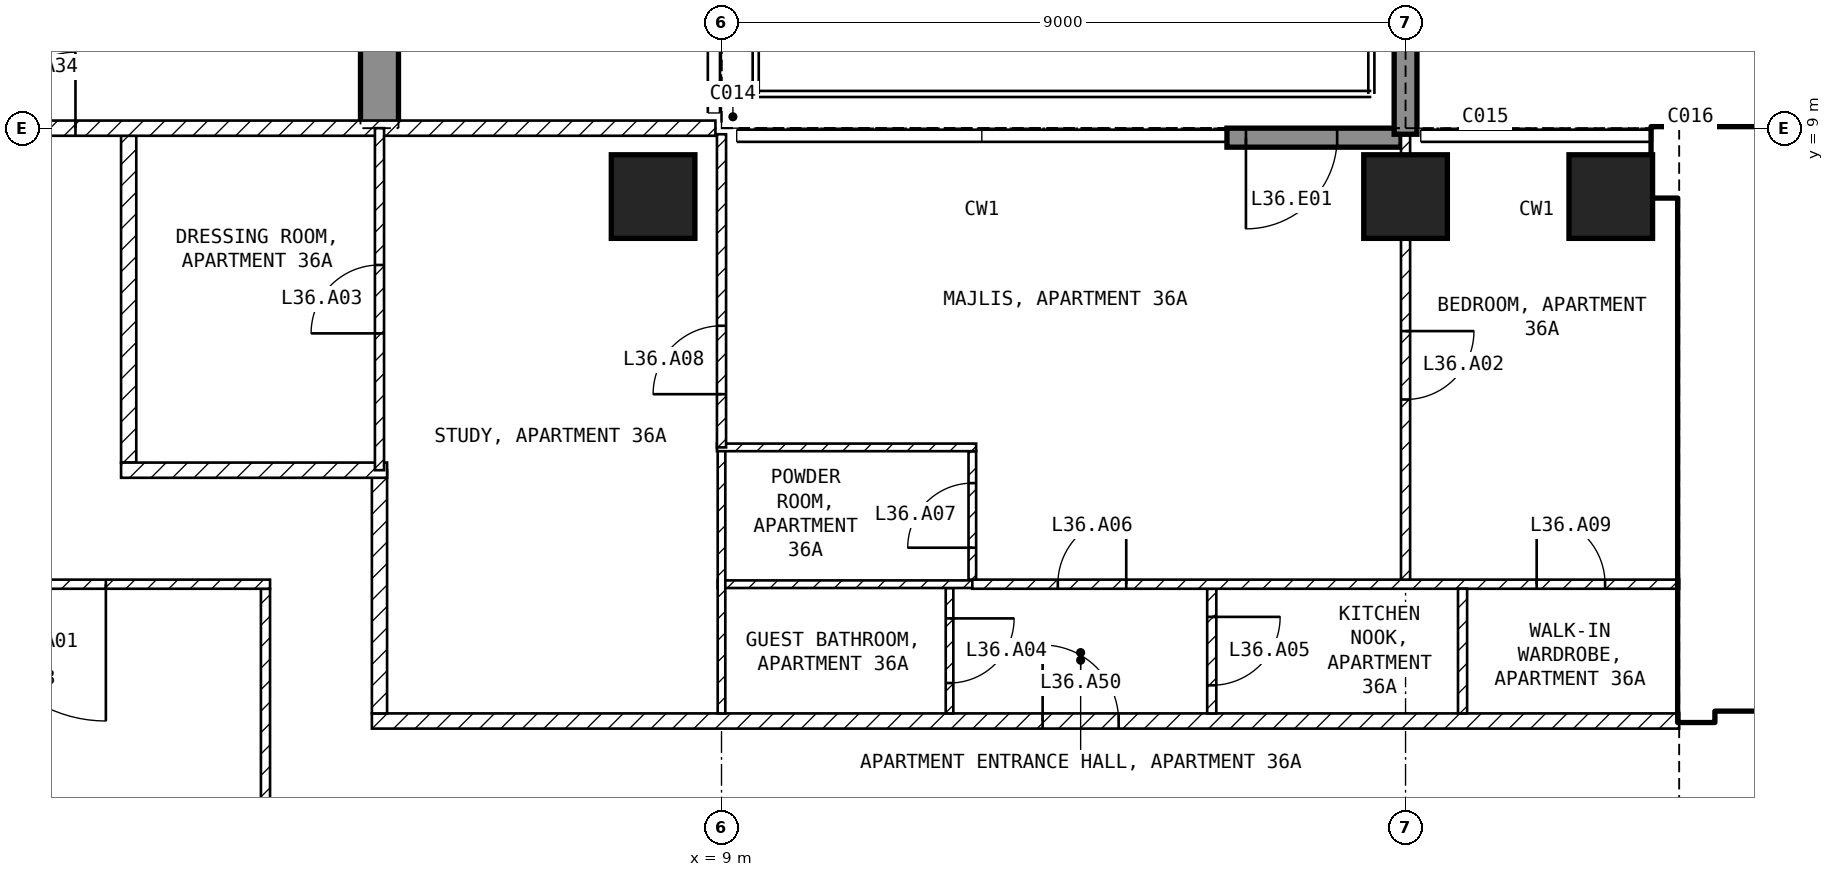
"""IFC4 building model, lengths in metres.
Left out: names, types, materials, properties, quantities, classifications, styles, units other than length and angle.
Written with IfcOpenShell. Run it as: python <this file> out.ifc"""

import sys

from ifc_helpers import new_model, si_unit, direction, frame, frame_2d, origin, origin_2d, place, context, subcontext, project, spatial, polyline, rectangle, outline, extrude, element, fill, save


model = new_model("IFC4")
c1 = context("Model", 3, precision=1e-05, world=origin(), true_north=direction((0.0, 1.0)))
c2 = subcontext(c1, "Body", "Model", "MODEL_VIEW")
j1 = project(units=[si_unit("LENGTHUNIT", "METRE"), si_unit("PLANEANGLEUNIT", "RADIAN")], contexts=[c1])
p1 = place(None, origin())
s1 = spatial("IfcSite", under=j1, at=p1, CompositionType="ELEMENT")
p2 = place(p1, origin())
s2 = spatial("IfcBuilding", under=s1, at=p2, CompositionType="ELEMENT")
p3 = place(p2, frame((0.0, 0.0, 147.9)))
s3 = spatial("IfcBuildingStorey", under=s2, at=p3, CompositionType="ELEMENT", Elevation=147.9)
for number, where, z_axis, x_axis in (
    (1, (8.1, 8.1, -0.25), (0.0, 0.0, 1.0), (1.0, 0.0, 0.0)),
    (2, (18.0, 8.1, -0.25), (0.0, 0.0, 1.0), (1.0, 0.0, 0.0)),
    (3, (20.7, 8.1, -0.25), (0.0, 0.0, 1.0), (1.0, 0.0, 0.0)),
):
    element("IfcColumn", number, at=place(p3, frame(where, z_axis=z_axis, x_axis=x_axis)), inside=s3, PredefinedType="COLUMN", context=c2, shape_type="SweptSolid", body=[
        extrude(rectangle(XDim=1.1, YDim=1.1, at=origin_2d()), origin(), (0.0, 0.0, 1.0), 3.5),
    ])
p4 = place(p3, frame((4.25, 9.0, -0.25), z_axis=(1.0, 0.0, 0.0), x_axis=(0.0, 1.0, 0.0)))
e4 = element("IfcWall", 4, at=p4, inside=s3, PredefinedType="SHEAR", context=c2, shape_type="SweptSolid", body=[
    extrude(outline(polyline([(0.0, 0.0), (2.1, 0.0), (2.1, 2.65), (4.5, 2.65), (4.5, 0.0), (9.9, 0.0), (9.9, 2.65), (12.3, 2.65), (12.3, 0.0), (16.55, 0.0), (16.55, 3.5), (0.0, 3.5), (0.0, 0.0)])), origin(), (0.0, 0.0, 1.0), 0.5),
])
p5 = place(p3, frame((17.94, 8.875, 0.0), z_axis=(0.0, 0.0, 1.0), x_axis=(-1.0, 0.0, 0.0)))
e5 = element("IfcWall", 5, at=p5, inside=s3, PredefinedType="SOLIDWALL", context=c2, shape_type="SweptSolid", body=[
    extrude(rectangle(XDim=2.29, YDim=0.25, at=frame_2d((1.145, 0.0))), origin(), (0.0, 0.0, 1.0), 3.25),
])
p6 = place(p5, frame((0.84, 0.0, 0.0)))
e6 = element("IfcOpeningElement", 6, at=p6, cuts=e5, PredefinedType="OPENING", context=c2, shape_type="SweptSolid", body=[
    extrude(rectangle(XDim=1.2, YDim=2.4, at=frame_2d((0.6, 1.2))), frame((0.0, 0.135, 0.0), z_axis=(0.0, -1.0, 0.0), x_axis=(1.0, 0.0, 0.0)), (0.0, 0.0, 1.0), 0.27),
])
p7 = place(p3, frame((18.0, 8.92, 0.0), z_axis=(0.0, 0.0, 1.0), x_axis=(0.0, 1.0, 0.0)))
e7 = element("IfcWall", 7, at=p7, inside=s3, PredefinedType="SOLIDWALL", context=c2, shape_type="SweptSolid", body=[
    extrude(rectangle(XDim=2.82, YDim=0.3, at=frame_2d((1.41, 0.0))), origin(), (0.0, 0.0, 1.0), 3.25),
])
p8 = place(p3, frame((21.25, 8.55, 0.0), z_axis=(0.0, 0.0, 1.0), x_axis=(1.0, 0.0, 0.0)))
e8 = element("IfcWall", 8, at=p8, inside=s3, PredefinedType="SHEAR", context=c2, shape_type="SweptSolid", body=[
    extrude(rectangle(XDim=8.2, YDim=0.9, at=frame_2d((4.1, 0.0))), origin(), (0.0, 0.0, 1.0), 3.25),
])
p9 = place(p3, frame((21.825, 1.2, 0.0), z_axis=(0.0, 0.0, 1.0), x_axis=(0.0, 1.0, 0.0)))
e9 = element("IfcWall", 9, at=p9, inside=s3, PredefinedType="SHEAR", context=c2, shape_type="SweptSolid", body=[
    extrude(rectangle(XDim=6.9, YDim=0.45, at=frame_2d((3.45, 0.0))), origin(), (0.0, 0.0, 1.0), 3.25),
])
p10 = place(p3, frame((22.05, 1.45, 0.0), z_axis=(0.0, 0.0, 1.0), x_axis=(1.0, 0.0, 0.0)))
e10 = element("IfcWall", 10, at=p10, inside=s3, PredefinedType="SOLIDWALL", context=c2, shape_type="SweptSolid", body=[
    extrude(rectangle(XDim=11.0, YDim=0.2, at=frame_2d((5.5, 0.0))), origin(), (0.0, 0.0, 1.0), 3.25),
])
p11 = place(p10, frame((0.75, 0.0, 0.0)))
e11 = element("IfcOpeningElement", 11, at=p11, cuts=e10, PredefinedType="OPENING", context=c2, shape_type="SweptSolid", body=[
    extrude(rectangle(XDim=1.0, YDim=2.1, at=frame_2d((0.5, 1.05))), frame((0.0, 0.11, 0.0), z_axis=(0.0, -1.0, 0.0), x_axis=(1.0, 0.0, 0.0)), (0.0, 0.0, 1.0), 0.22),
])
p12 = place(p10, frame((3.25, 0.0, 0.0)))
e12 = element("IfcOpeningElement", 12, at=p12, cuts=e10, PredefinedType="OPENING", context=c2, shape_type="SweptSolid", body=[
    extrude(rectangle(XDim=1.0, YDim=2.1, at=frame_2d((0.5, 1.05))), frame((0.0, 0.11, 0.0), z_axis=(0.0, -1.0, 0.0), x_axis=(1.0, 0.0, 0.0)), (0.0, 0.0, 1.0), 0.22),
])
p13 = place(p10, frame((9.075, 0.0, 0.0)))
e13 = element("IfcOpeningElement", 13, at=p13, cuts=e10, PredefinedType="OPENING", context=c2, shape_type="SweptSolid", body=[
    extrude(rectangle(XDim=0.9, YDim=2.1, at=frame_2d((0.45, 1.05))), frame((0.0, 0.11, 0.0), z_axis=(0.0, -1.0, 0.0), x_axis=(1.0, 0.0, 0.0)), (0.0, 0.0, 1.0), 0.22),
])
p14 = place(p3, frame((22.05, 5.15, 0.0), z_axis=(0.0, 0.0, 1.0), x_axis=(1.0, 0.0, 0.0)))
e14 = element("IfcWall", 14, at=p14, inside=s3, PredefinedType="SOLIDWALL", context=c2, shape_type="SweptSolid", body=[
    extrude(rectangle(XDim=6.3, YDim=0.2, at=frame_2d((3.15, 0.0))), origin(), (0.0, 0.0, 1.0), 3.25),
])
p15 = place(p14, frame((0.2, 0.0, 0.0)))
e15 = element("IfcOpeningElement", 15, at=p15, cuts=e14, PredefinedType="OPENING", context=c2, shape_type="SweptSolid", body=[
    extrude(rectangle(XDim=1.0, YDim=2.1, at=frame_2d((0.5, 1.05))), frame((0.0, 0.11, 0.0), z_axis=(0.0, -1.0, 0.0), x_axis=(1.0, 0.0, 0.0)), (0.0, 0.0, 1.0), 0.22),
])
p16 = place(p3, frame((3.0, -2.94, 0.0), z_axis=(0.0, 0.0, 1.0), x_axis=(0.0, 1.0, 0.0)))
e16 = element("IfcWall", 16, at=p16, inside=s3, PredefinedType="PARTITIONING", context=c2, shape_type="SweptSolid", body=[
    extrude(rectangle(XDim=5.88, YDim=0.12, at=frame_2d((2.94, 0.0))), origin(), (0.0, 0.0, 1.0), 3.25),
])
p17 = place(p3, frame((3.06, 3.0, 0.0), z_axis=(0.0, 0.0, 1.0), x_axis=(-1.0, 0.0, 0.0)))
e17 = element("IfcWall", 17, at=p17, inside=s3, PredefinedType="PARTITIONING", context=c2, shape_type="SweptSolid", body=[
    extrude(rectangle(XDim=6.12, YDim=0.12, at=frame_2d((3.06, 0.0))), origin(), (0.0, 0.0, 1.0), 3.25),
])
p18 = place(p17, frame((2.16, 0.0, 0.0)))
e18 = element("IfcOpeningElement", 18, at=p18, cuts=e17, PredefinedType="OPENING", context=c2, shape_type="SweptSolid", body=[
    extrude(rectangle(XDim=1.8, YDim=2.1, at=frame_2d((0.9, 1.05))), frame((0.0, 0.07, 0.0), z_axis=(0.0, -1.0, 0.0), x_axis=(1.0, 0.0, 0.0)), (0.0, 0.0, 1.0), 0.14),
])
p19 = place(p3, frame((4.4, 1.2, 0.0), z_axis=(0.0, 0.0, 1.0), x_axis=(1.0, 0.0, 0.0)))
e19 = element("IfcWall", 19, at=p19, inside=s3, PredefinedType="PARTITIONING", context=c2, shape_type="SweptSolid", body=[
    extrude(rectangle(XDim=17.2, YDim=0.2, at=frame_2d((8.6, 0.0))), origin(), (0.0, 0.0, 1.0), 3.25),
])
p20 = place(p19, frame((8.825, 0.0, 0.0)))
e20 = element("IfcOpeningElement", 20, at=p20, cuts=e19, PredefinedType="OPENING", context=c2, shape_type="SweptSolid", body=[
    extrude(rectangle(XDim=1.0, YDim=2.1, at=frame_2d((0.5, 1.05))), frame((0.0, 0.11, 0.0), z_axis=(0.0, -1.0, 0.0), x_axis=(1.0, 0.0, 0.0)), (0.0, 0.0, 1.0), 0.22),
])
p21 = place(p3, frame((4.5, 4.5, 0.0), z_axis=(0.0, 0.0, 1.0), x_axis=(0.0, -1.0, 0.0)))
e21 = element("IfcWall", 21, at=p21, inside=s3, PredefinedType="PARTITIONING", context=c2, shape_type="SweptSolid", body=[
    extrude(rectangle(XDim=3.2, YDim=0.2, at=frame_2d((1.6, 0.0))), origin(), (0.0, 0.0, 1.0), 3.25),
])
p22 = place(p3, frame((1.2, 8.9, 0.0), z_axis=(0.0, 0.0, 1.0), x_axis=(0.0, -1.0, 0.0)))
e22 = element("IfcWall", 22, at=p22, inside=s3, PredefinedType="PARTITIONING", context=c2, shape_type="SweptSolid", body=[
    extrude(rectangle(XDim=4.3, YDim=0.2, at=frame_2d((2.15, 0.0))), origin(), (0.0, 0.0, 1.0), 3.25),
])
p23 = place(p3, frame((1.1, 4.5, 0.0), z_axis=(0.0, 0.0, 1.0), x_axis=(1.0, 0.0, 0.0)))
e23 = element("IfcWall", 23, at=p23, inside=s3, PredefinedType="PARTITIONING", context=c2, shape_type="SweptSolid", body=[
    extrude(rectangle(XDim=3.5, YDim=0.2, at=frame_2d((1.75, 0.0))), origin(), (0.0, 0.0, 1.0), 3.25),
])
p24 = place(p3, frame((-8.92, 9.0, 0.0), z_axis=(0.0, 0.0, 1.0), x_axis=(1.0, 0.0, 0.0)))
e24 = element("IfcWall", 24, at=p24, inside=s3, PredefinedType="PARTITIONING", context=c2, shape_type="SweptSolid", body=[
    extrude(rectangle(XDim=17.84, YDim=0.2, at=frame_2d((8.92, 0.0))), origin(), (0.0, 0.0, 1.0), 3.25),
])
p25 = place(p24, frame((8.42, 0.0, 0.0)))
e25 = element("IfcOpeningElement", 25, at=p25, cuts=e24, PredefinedType="OPENING", context=c2, shape_type="SweptSolid", body=[
    extrude(rectangle(XDim=1.0, YDim=2.1, at=frame_2d((0.5, 1.05))), frame((0.0, 0.11, 0.0), z_axis=(0.0, -1.0, 0.0), x_axis=(1.0, 0.0, 0.0)), (0.0, 0.0, 1.0), 0.22),
])
p26 = place(p3, frame((12.0, 2.95, 0.0), z_axis=(0.0, 0.0, 1.0), x_axis=(0.0, -1.0, 0.0)))
e26 = element("IfcWall", 26, at=p26, inside=s3, PredefinedType="PARTITIONING", context=c2, shape_type="SweptSolid", body=[
    extrude(rectangle(XDim=1.65, YDim=0.1, at=frame_2d((0.825, 0.0))), origin(), (0.0, 0.0, 1.0), 3.25),
])
p27 = place(p26, frame((0.4, 0.0, 0.0)))
e27 = element("IfcOpeningElement", 27, at=p27, cuts=e26, PredefinedType="OPENING", context=c2, shape_type="SweptSolid", body=[
    extrude(rectangle(XDim=0.85, YDim=2.1, at=frame_2d((0.425, 1.05))), frame((0.0, 0.06, 0.0), z_axis=(0.0, -1.0, 0.0), x_axis=(1.0, 0.0, 0.0)), (0.0, 0.0, 1.0), 0.12),
])
p28 = place(p3, frame((8.95, 3.0, 0.0), z_axis=(0.0, 0.0, 1.0), x_axis=(1.0, 0.0, 0.0)))
e28 = element("IfcWall", 28, at=p28, inside=s3, PredefinedType="PARTITIONING", context=c2, shape_type="SweptSolid", body=[
    extrude(rectangle(XDim=3.35, YDim=0.1, at=frame_2d((1.675, 0.0))), origin(), (0.0, 0.0, 1.0), 3.25),
])
p29 = place(p3, frame((9.0, 1.3, 0.0), z_axis=(0.0, 0.0, 1.0), x_axis=(0.0, 1.0, 0.0)))
e29 = element("IfcWall", 29, at=p29, inside=s3, PredefinedType="PARTITIONING", context=c2, shape_type="SweptSolid", body=[
    extrude(rectangle(XDim=3.5, YDim=0.1, at=frame_2d((1.75, 0.0))), origin(), (0.0, 0.0, 1.0), 3.25),
])
p30 = place(p3, frame((15.45, 2.94, 0.0), z_axis=(0.0, 0.0, 1.0), x_axis=(0.0, -1.0, 0.0)))
e30 = element("IfcWall", 30, at=p30, inside=s3, PredefinedType="PARTITIONING", context=c2, shape_type="SweptSolid", body=[
    extrude(rectangle(XDim=1.64, YDim=0.12, at=frame_2d((0.82, 0.0))), origin(), (0.0, 0.0, 1.0), 3.25),
])
p31 = place(p30, frame((0.37, 0.0, 0.0)))
e31 = element("IfcOpeningElement", 31, at=p31, cuts=e30, PredefinedType="OPENING", context=c2, shape_type="SweptSolid", body=[
    extrude(rectangle(XDim=0.9, YDim=2.1, at=frame_2d((0.45, 1.05))), frame((0.0, 0.07, 0.0), z_axis=(0.0, -1.0, 0.0), x_axis=(1.0, 0.0, 0.0)), (0.0, 0.0, 1.0), 0.14),
])
p32 = place(p3, frame((12.3, 3.0, 0.0), z_axis=(0.0, 0.0, 1.0), x_axis=(1.0, 0.0, 0.0)))
e32 = element("IfcWall", 32, at=p32, inside=s3, PredefinedType="PARTITIONING", context=c2, shape_type="SweptSolid", body=[
    extrude(rectangle(XDim=9.3, YDim=0.12, at=frame_2d((4.65, 0.0))), origin(), (0.0, 0.0, 1.0), 3.25),
])
p33 = place(p32, frame((1.125, 0.0, 0.0)))
e33 = element("IfcOpeningElement", 33, at=p33, cuts=e32, PredefinedType="OPENING", context=c2, shape_type="SweptSolid", body=[
    extrude(rectangle(XDim=0.9, YDim=2.1, at=frame_2d((0.45, 1.05))), frame((0.0, 0.07, 0.0), z_axis=(0.0, -1.0, 0.0), x_axis=(1.0, 0.0, 0.0)), (0.0, 0.0, 1.0), 0.14),
])
p34 = place(p32, frame((7.425, 0.0, 0.0)))
e34 = element("IfcOpeningElement", 34, at=p34, cuts=e32, PredefinedType="OPENING", context=c2, shape_type="SweptSolid", body=[
    extrude(rectangle(XDim=0.9, YDim=2.1, at=frame_2d((0.45, 1.05))), frame((0.0, 0.07, 0.0), z_axis=(0.0, -1.0, 0.0), x_axis=(1.0, 0.0, 0.0)), (0.0, 0.0, 1.0), 0.14),
])
p35 = place(p3, frame((18.75, 2.94, 0.0), z_axis=(0.0, 0.0, 1.0), x_axis=(0.0, -1.0, 0.0)))
e35 = element("IfcWall", 35, at=p35, inside=s3, PredefinedType="PARTITIONING", context=c2, shape_type="SweptSolid", body=[
    extrude(rectangle(XDim=1.64, YDim=0.12, at=frame_2d((0.82, 0.0))), origin(), (0.0, 0.0, 1.0), 3.25),
])
p36 = place(p3, frame((12.3, 3.06, 0.0), z_axis=(0.0, 0.0, 1.0), x_axis=(0.0, 1.0, 0.0)))
e36 = element("IfcWall", 36, at=p36, inside=s3, PredefinedType="PARTITIONING", context=c2, shape_type="SweptSolid", body=[
    extrude(rectangle(XDim=1.69, YDim=0.1, at=frame_2d((0.845, 0.0))), origin(), (0.0, 0.0, 1.0), 3.25),
])
p37 = place(p36, frame((0.42, 0.0, 0.0)))
e37 = element("IfcOpeningElement", 37, at=p37, cuts=e36, PredefinedType="OPENING", context=c2, shape_type="SweptSolid", body=[
    extrude(rectangle(XDim=0.85, YDim=2.1, at=frame_2d((0.425, 1.05))), frame((0.0, 0.06, 0.0), z_axis=(0.0, -1.0, 0.0), x_axis=(1.0, 0.0, 0.0)), (0.0, 0.0, 1.0), 0.12),
])
p38 = place(p3, frame((12.35, 4.8, 0.0), z_axis=(0.0, 0.0, 1.0), x_axis=(-1.0, 0.0, 0.0)))
e38 = element("IfcWall", 38, at=p38, inside=s3, PredefinedType="PARTITIONING", context=c2, shape_type="SweptSolid", body=[
    extrude(rectangle(XDim=3.41, YDim=0.1, at=frame_2d((1.705, 0.0))), origin(), (0.0, 0.0, 1.0), 3.25),
])
p39 = place(p3, frame((18.0, 8.92, 0.0), z_axis=(0.0, 0.0, 1.0), x_axis=(0.0, -1.0, 0.0)))
e39 = element("IfcWall", 39, at=p39, inside=s3, PredefinedType="PARTITIONING", context=c2, shape_type="SweptSolid", body=[
    extrude(rectangle(XDim=5.86, YDim=0.12, at=frame_2d((2.93, 0.0))), origin(), (0.0, 0.0, 1.0), 2.414),
])
p40 = place(p39, frame((2.59, 0.0, 0.0)))
e40 = element("IfcOpeningElement", 40, at=p40, cuts=e39, PredefinedType="OPENING", context=c2, shape_type="SweptSolid", body=[
    extrude(rectangle(XDim=0.9, YDim=2.1, at=frame_2d((0.45, 1.05))), frame((0.0, 0.07, 0.0), z_axis=(0.0, -1.0, 0.0), x_axis=(1.0, 0.0, 0.0)), (0.0, 0.0, 1.0), 0.14),
])
p41 = place(p3, frame((9.0, 4.8, 0.0), z_axis=(0.0, 0.0, 1.0), x_axis=(0.0, 1.0, 0.0)))
e41 = element("IfcWall", 41, at=p41, inside=s3, PredefinedType="PARTITIONING", context=c2, shape_type="SweptSolid", body=[
    extrude(rectangle(XDim=4.12, YDim=0.12, at=frame_2d((2.06, 0.0))), origin(), (0.0, 0.0, 1.0), 3.25),
])
p42 = place(p41, frame((0.7, 0.0, 0.0)))
e42 = element("IfcOpeningElement", 42, at=p42, cuts=e41, PredefinedType="OPENING", context=c2, shape_type="SweptSolid", body=[
    extrude(rectangle(XDim=0.9, YDim=2.1, at=frame_2d((0.45, 1.05))), frame((0.0, 0.07, 0.0), z_axis=(0.0, -1.0, 0.0), x_axis=(1.0, 0.0, 0.0)), (0.0, 0.0, 1.0), 0.14),
])
p43 = place(p3, frame((4.5, 4.5, 0.0), z_axis=(0.0, 0.0, 1.0), x_axis=(0.0, 1.0, 0.0)))
e43 = element("IfcWall", 43, at=p43, inside=s3, PredefinedType="PARTITIONING", context=c2, shape_type="SweptSolid", body=[
    extrude(rectangle(XDim=4.5, YDim=0.12, at=frame_2d((2.25, 0.0))), origin(), (0.0, 0.0, 1.0), 3.25),
])
p44 = place(p43, frame((1.8, 0.0, 0.0)))
e44 = element("IfcOpeningElement", 44, at=p44, cuts=e43, PredefinedType="OPENING", context=c2, shape_type="SweptSolid", body=[
    extrude(rectangle(XDim=0.9, YDim=2.1, at=frame_2d((0.45, 1.05))), frame((0.0, 0.07, 0.0), z_axis=(0.0, -1.0, 0.0), x_axis=(1.0, 0.0, 0.0)), (0.0, 0.0, 1.0), 0.14),
])
p45 = place(p6, origin())
e45 = element("IfcDoor", 45, at=p45, inside=s3, OperationType="SINGLE_SWING_RIGHT", PredefinedType="DOOR", context=c2, shape_type="SweptSolid", body=[
    extrude(rectangle(XDim=1.2, YDim=2.4, at=frame_2d((0.6, 1.2))), frame((0.0, 0.025, 0.0), z_axis=(0.0, -1.0, 0.0), x_axis=(1.0, 0.0, 0.0)), (0.0, 0.0, 1.0), 0.05),
])
fill(e6, e45)
p46 = place(p15, origin())
e46 = element("IfcDoor", 46, at=p46, inside=s3, OperationType="SINGLE_SWING_LEFT", PredefinedType="DOOR", context=c2, shape_type="SweptSolid", body=[
    extrude(rectangle(XDim=1.0, YDim=2.1, at=frame_2d((0.5, 1.05))), frame((0.0, 0.025, 0.0), z_axis=(0.0, -1.0, 0.0), x_axis=(1.0, 0.0, 0.0)), (0.0, 0.0, 1.0), 0.05),
])
fill(e15, e46)
p47 = place(p18, origin())
e47 = element("IfcDoor", 47, at=p47, inside=s3, OperationType="SINGLE_SWING_LEFT", PredefinedType="DOOR", context=c2, shape_type="SweptSolid", body=[
    extrude(rectangle(XDim=1.8, YDim=2.1, at=frame_2d((0.9, 1.05))), frame((0.0, 0.025, 0.0), z_axis=(0.0, -1.0, 0.0), x_axis=(1.0, 0.0, 0.0)), (0.0, 0.0, 1.0), 0.05),
])
fill(e18, e47)
p48 = place(p40, origin())
e48 = element("IfcDoor", 48, at=p48, inside=s3, OperationType="SINGLE_SWING_LEFT", PredefinedType="DOOR", context=c2, shape_type="SweptSolid", body=[
    extrude(rectangle(XDim=0.9, YDim=2.1, at=frame_2d((0.45, 1.05))), frame((0.0, 0.025, 0.0), z_axis=(0.0, -1.0, 0.0), x_axis=(1.0, 0.0, 0.0)), (0.0, 0.0, 1.0), 0.05),
])
fill(e40, e48)
p49 = place(p44, origin())
e49 = element("IfcDoor", 49, at=p49, inside=s3, OperationType="SINGLE_SWING_LEFT", PredefinedType="DOOR", context=c2, shape_type="SweptSolid", body=[
    extrude(rectangle(XDim=0.9, YDim=2.1, at=frame_2d((0.45, 1.05))), frame((0.0, 0.025, 0.0), z_axis=(0.0, -1.0, 0.0), x_axis=(1.0, 0.0, 0.0)), (0.0, 0.0, 1.0), 0.05),
])
fill(e44, e49)
p50 = place(p27, origin())
e50 = element("IfcDoor", 50, at=p50, inside=s3, OperationType="SINGLE_SWING_LEFT", PredefinedType="DOOR", context=c2, shape_type="SweptSolid", body=[
    extrude(rectangle(XDim=0.85, YDim=2.1, at=frame_2d((0.425, 1.05))), frame((0.0, 0.025, 0.0), z_axis=(0.0, -1.0, 0.0), x_axis=(1.0, 0.0, 0.0)), (0.0, 0.0, 1.0), 0.05),
])
fill(e27, e50)
p51 = place(p31, origin())
e51 = element("IfcDoor", 51, at=p51, inside=s3, OperationType="SINGLE_SWING_LEFT", PredefinedType="DOOR", context=c2, shape_type="SweptSolid", body=[
    extrude(rectangle(XDim=0.9, YDim=2.1, at=frame_2d((0.45, 1.05))), frame((0.0, 0.025, 0.0), z_axis=(0.0, -1.0, 0.0), x_axis=(1.0, 0.0, 0.0)), (0.0, 0.0, 1.0), 0.05),
])
fill(e31, e51)
p52 = place(p33, origin())
e52 = element("IfcDoor", 52, at=p52, inside=s3, OperationType="SINGLE_SWING_RIGHT", PredefinedType="DOOR", context=c2, shape_type="SweptSolid", body=[
    extrude(rectangle(XDim=0.9, YDim=2.1, at=frame_2d((0.45, 1.05))), frame((0.0, 0.025, 0.0), z_axis=(0.0, -1.0, 0.0), x_axis=(1.0, 0.0, 0.0)), (0.0, 0.0, 1.0), 0.05),
])
fill(e33, e52)
p53 = place(p37, origin())
e53 = element("IfcDoor", 53, at=p53, inside=s3, OperationType="SINGLE_SWING_LEFT", PredefinedType="DOOR", context=c2, shape_type="SweptSolid", body=[
    extrude(rectangle(XDim=0.85, YDim=2.1, at=frame_2d((0.425, 1.05))), frame((0.0, 0.025, 0.0), z_axis=(0.0, -1.0, 0.0), x_axis=(1.0, 0.0, 0.0)), (0.0, 0.0, 1.0), 0.05),
])
fill(e37, e53)
p54 = place(p42, origin())
e54 = element("IfcDoor", 54, at=p54, inside=s3, OperationType="SINGLE_SWING_LEFT", PredefinedType="DOOR", context=c2, shape_type="SweptSolid", body=[
    extrude(rectangle(XDim=0.9, YDim=2.1, at=frame_2d((0.45, 1.05))), frame((0.0, 0.025, 0.0), z_axis=(0.0, -1.0, 0.0), x_axis=(1.0, 0.0, 0.0)), (0.0, 0.0, 1.0), 0.05),
])
fill(e42, e54)
p55 = place(p34, origin())
e55 = element("IfcDoor", 55, at=p55, inside=s3, OperationType="SINGLE_SWING_LEFT", PredefinedType="DOOR", context=c2, shape_type="SweptSolid", body=[
    extrude(rectangle(XDim=0.9, YDim=2.1, at=frame_2d((0.45, 1.05))), frame((0.0, 0.025, 0.0), z_axis=(0.0, -1.0, 0.0), x_axis=(1.0, 0.0, 0.0)), (0.0, 0.0, 1.0), 0.05),
])
fill(e34, e55)
p56 = place(p25, origin())
e56 = element("IfcDoor", 56, at=p56, inside=s3, OperationType="SINGLE_SWING_RIGHT", PredefinedType="DOOR", context=c2, shape_type="SweptSolid", body=[
    extrude(rectangle(XDim=1.0, YDim=2.1, at=frame_2d((0.5, 1.05))), frame((0.0, 0.025, 0.0), z_axis=(0.0, -1.0, 0.0), x_axis=(1.0, 0.0, 0.0)), (0.0, 0.0, 1.0), 0.05),
])
fill(e25, e56)
p57 = place(p20, origin())
e57 = element("IfcDoor", 57, at=p57, inside=s3, OperationType="SINGLE_SWING_LEFT", PredefinedType="DOOR", context=c2, shape_type="SweptSolid", body=[
    extrude(rectangle(XDim=1.0, YDim=2.1, at=frame_2d((0.5, 1.05))), frame((0.0, 0.025, 0.0), z_axis=(0.0, -1.0, 0.0), x_axis=(1.0, 0.0, 0.0)), (0.0, 0.0, 1.0), 0.05),
])
fill(e20, e57)
save(model, sys.argv[1])
